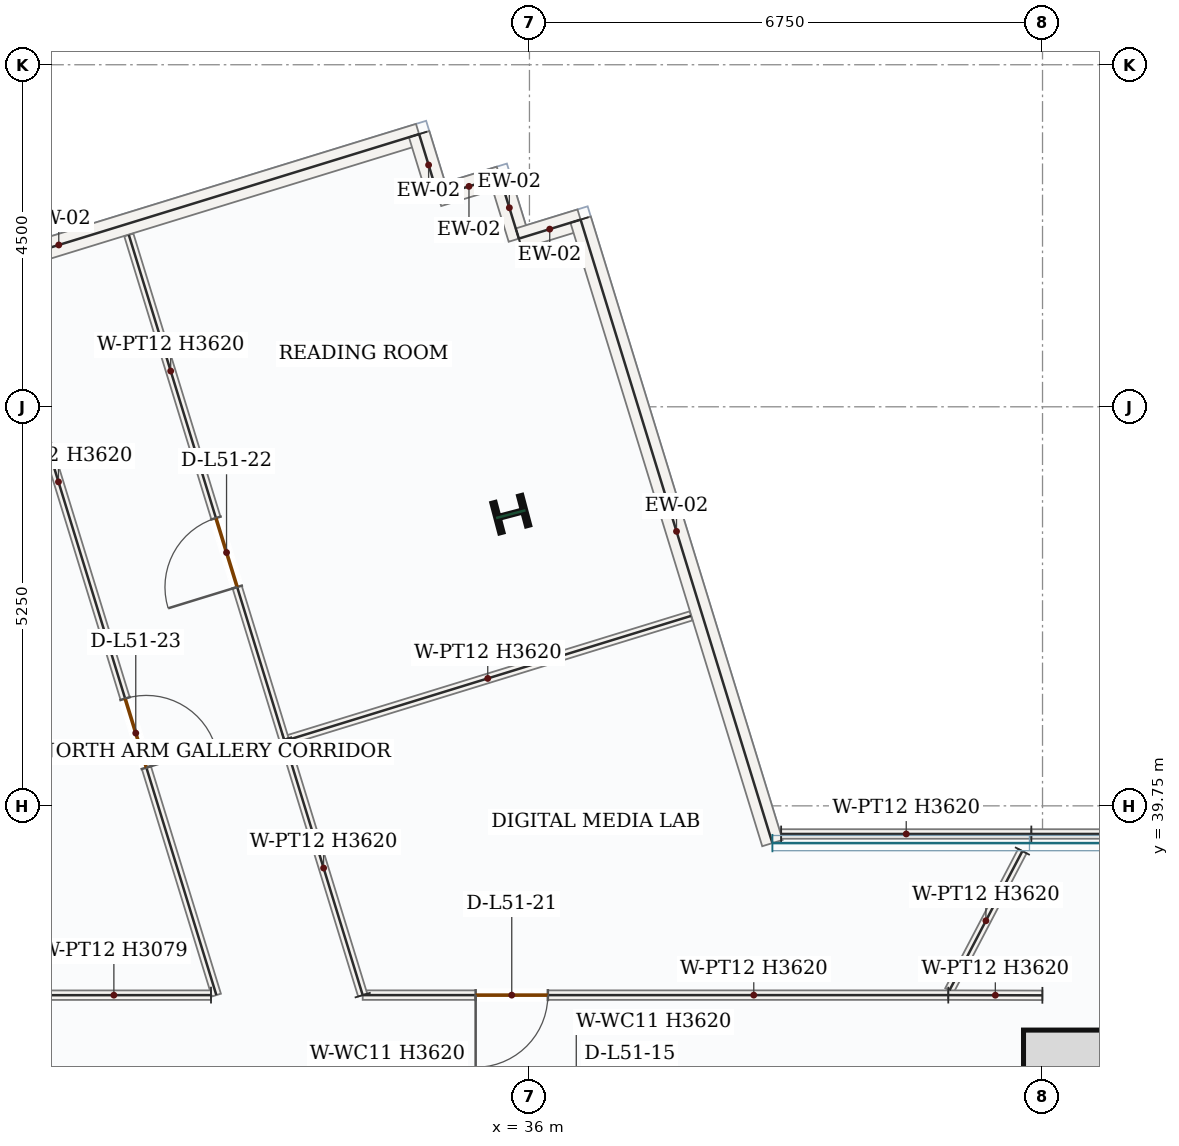
"""IFC4 building model, lengths in metres.
Left out: names, types, materials, properties, quantities, classifications, styles, units other than length and angle.
Written with IfcOpenShell. Run it as: python <this file> out.ifc"""

import sys

from ifc_helpers import new_model, si_unit, direction, frame, frame_2d, origin, origin_2d, place, context, subcontext, project, spatial, rectangle, i_section, extrude, source, transform, mapped, element, fill, save


model = new_model("IFC4")
c1 = context("Model", 3, precision=1e-05, world=origin(), true_north=direction((0.0, 1.0)))
c2 = subcontext(c1, "Body", "Model", "MODEL_VIEW")
j1 = project(units=[si_unit("LENGTHUNIT", "METRE"), si_unit("PLANEANGLEUNIT", "RADIAN")], contexts=[c1])
p1 = place(None, origin())
s1 = spatial("IfcSite", under=j1, at=p1, CompositionType="ELEMENT")
p2 = place(p1, origin())
s2 = spatial("IfcBuilding", under=s1, at=p2, CompositionType="ELEMENT")
p3 = place(p2, frame((0.0, 0.0, 217.5)))
s3 = spatial("IfcBuildingStorey", under=s2, at=p3, CompositionType="ELEMENT", Elevation=217.5)
p4 = place(p3, frame((43.0, 28.05, 0.0), z_axis=(0.0, 0.0, 1.0), x_axis=(0.0, 1.0, 0.0)))
e1 = element("IfcWall", 1, at=p4, inside=s3, PredefinedType="SHEAR", context=c2, shape_type="SweptSolid", body=[
    extrude(rectangle(XDim=8.55, YDim=0.5, at=frame_2d((4.275, 0.0))), origin(), (0.0, 0.0, 1.0), 3.62),
])
p5 = place(p4, frame((1.5, 0.0, 0.0)))
e2 = element("IfcOpeningElement", 2, at=p5, cuts=e1, PredefinedType="OPENING", context=c2, shape_type="SweptSolid", body=[
    extrude(rectangle(XDim=1.1, YDim=2.2, at=frame_2d((0.55, 1.1))), frame((0.0, 0.26, 0.0), z_axis=(0.0, -1.0, 0.0), x_axis=(1.0, 0.0, 0.0)), (0.0, 0.0, 1.0), 0.52),
])
m1 = source(origin(), c2, "Body", "SweptSolid", [
    extrude(rectangle(XDim=7.0, YDim=0.5, at=frame_2d((3.5, 0.0))), origin(), (0.0, 0.0, 1.0), 3.62),
])
p6 = place(p3, frame((43.25, 36.35, 0.0), z_axis=(0.0, 0.0, 1.0), x_axis=(1.0, 0.0, 0.0)))
e3 = element("IfcWall", 3, at=p6, inside=s3, PredefinedType="SHEAR", context=c2, shape_type="MappedRepresentation", body=[
    mapped(m1, transform((0.0, 0.0, 0.0), x_axis=(1.0, 0.0, 0.0), y_axis=(0.0, 1.0, 0.0), z_axis=(0.0, 0.0, 1.0), scale=1.0)),
])
m2 = source(origin(), c2, "Body", "SweptSolid", [
    extrude(rectangle(XDim=1.2, YDim=1.2, at=origin_2d()), origin(), (0.0, 0.0, 1.0), 3.9),
])
p7 = place(p3, frame((43.1, 36.2, 0.0), z_axis=(0.0, 0.0, 1.0), x_axis=(1.0, 0.0, 0.0)))
e4 = element("IfcColumn", 4, at=p7, inside=s3, PredefinedType="COLUMN", context=c2, shape_type="MappedRepresentation", body=[
    mapped(m2, transform((0.0, 0.0, 0.0), x_axis=(1.0, 0.0, 0.0), y_axis=(0.0, 1.0, 0.0), z_axis=(0.0, 0.0, 1.0), scale=1.0)),
])
m3 = source(origin(), c2, "Body", "SweptSolid", [
    extrude(i_section(OverallWidth=0.404, OverallDepth=0.407, WebThickness=0.027, FlangeThickness=0.044, FilletRadius=0.018, at=origin_2d()), origin(), (0.0, 0.0, 1.0), 3.9),
])
p8 = place(p3, frame((35.755, 43.588, 0.0), z_axis=(0.0, 0.0, 1.0), x_axis=(-0.255445757936, 0.966823388604, 0.0)))
e5 = element("IfcColumn", 5, at=p8, inside=s3, PredefinedType="COLUMN", context=c2, shape_type="MappedRepresentation", body=[
    mapped(m3, transform((0.0, 0.0, 0.0), x_axis=(1.0, 0.0, 0.0), y_axis=(0.0, 1.0, 0.0), z_axis=(0.0, 0.0, 1.0), scale=1.0)),
])
m4 = source(origin(), c2, "Body", "SweptSolid", [
    extrude(rectangle(XDim=9.92, YDim=0.28, at=frame_2d((4.96, 0.0))), origin(), (0.0, 0.0, 1.0), 3.62),
])
p9 = place(p3, frame((25.067, 45.671, 0.0), z_axis=(0.0, 0.0, 1.0), x_axis=(0.955796567368, 0.294028777175, 0.0)))
e6 = element("IfcWall", 6, at=p9, inside=s3, PredefinedType="SOLIDWALL", context=c2, shape_type="MappedRepresentation", body=[
    mapped(m4, transform((0.0, 0.0, 0.0), x_axis=(1.0, 0.0, 0.0), y_axis=(0.0, 1.0, 0.0), z_axis=(0.0, 0.0, 1.0), scale=1.0)),
])
m5 = source(origin(), c2, "Body", "SweptSolid", [
    extrude(rectangle(XDim=0.85, YDim=0.28, at=frame_2d((0.425, 0.0))), origin(), (0.0, 0.0, 1.0), 3.62),
])
for number, where, z_axis, x_axis in (
    (7, (34.548, 48.587, 0.0), (0.0, 0.0, 1.0), (0.294, -0.956, 0.0)),
    (8, (34.798, 47.775, 0.0), (0.0, 0.0, 1.0), (0.956, 0.294, 0.0)),
    (9, (35.611, 48.025, 0.0), (0.0, 0.0, 1.0), (0.294, -0.956, 0.0)),
    (10, (35.861, 47.212, 0.0), (0.0, 0.0, 1.0), (0.956, 0.294, 0.0)),
):
    element("IfcWall", number, at=place(p3, frame(where, z_axis=z_axis, x_axis=x_axis)), inside=s3, PredefinedType="SOLIDWALL", context=c2, shape_type="MappedRepresentation", body=[
        mapped(m5, transform((0.0, 0.0, 0.0), x_axis=(1.0, 0.0, 0.0), y_axis=(0.0, 1.0, 0.0), z_axis=(0.0, 0.0, 1.0), scale=1.0)),
    ])
m6 = source(origin(), c2, "Body", "SweptSolid", [
    extrude(rectangle(XDim=8.582, YDim=0.28, at=frame_2d((4.291, 0.0))), origin(), (0.0, 0.0, 1.0), 3.62),
])
p10 = place(p3, frame((36.673, 47.462, 0.0), z_axis=(0.0, 0.0, 1.0), x_axis=(0.294019877333, -0.955799305154, 0.0)))
e11 = element("IfcWall", 11, at=p10, inside=s3, PredefinedType="SOLIDWALL", context=c2, shape_type="MappedRepresentation", body=[
    mapped(m6, transform((0.0, 0.0, 0.0), x_axis=(1.0, 0.0, 0.0), y_axis=(0.0, 1.0, 0.0), z_axis=(0.0, 0.0, 1.0), scale=1.0)),
])
p11 = place(p3, frame((41.51, 37.26, 0.0), z_axis=(0.0, 0.0, 1.0), x_axis=(-1.0, 0.0, 0.0)))
e12 = element("IfcWall", 12, at=p11, inside=s3, PredefinedType="PARTITIONING", context=c2, shape_type="SweptSolid", body=[
    extrude(rectangle(XDim=7.704, YDim=0.125, at=frame_2d((3.852, 0.0))), origin(), (0.0, 0.0, 1.0), 3.62),
])
p12 = place(p11, frame((5.268, 0.0, 0.0)))
e13 = element("IfcOpeningElement", 13, at=p12, cuts=e12, PredefinedType="OPENING", context=c2, shape_type="SweptSolid", body=[
    extrude(rectangle(XDim=0.95, YDim=2.15, at=frame_2d((0.475, 1.075))), frame((0.0, 0.073, 0.0), z_axis=(0.0, -1.0, 0.0), x_axis=(1.0, 0.0, 0.0)), (0.0, 0.0, 1.0), 0.145),
])
m7 = source(origin(), c2, "Body", "SweptSolid", [
    extrude(rectangle(XDim=3.498, YDim=0.125, at=frame_2d((1.749, 0.0))), origin(), (0.0, 0.0, 1.0), 3.62),
])
p13 = place(p3, frame((33.806, 37.26, 0.0), z_axis=(0.0, 0.0, 1.0), x_axis=(-0.294012288782, 0.955801639487, 0.0)))
e14 = element("IfcWall", 14, at=p13, inside=s3, PredefinedType="PARTITIONING", context=c2, shape_type="MappedRepresentation", body=[
    mapped(m7, transform((0.0, 0.0, 0.0), x_axis=(1.0, 0.0, 0.0), y_axis=(0.0, 1.0, 0.0), z_axis=(0.0, 0.0, 1.0), scale=1.0)),
])
m8 = source(origin(), c2, "Body", "SweptSolid", [
    extrude(rectangle(XDim=5.595, YDim=0.125, at=frame_2d((2.797, 0.0))), origin(), (0.0, 0.0, 1.0), 3.62),
])
p14 = place(p3, frame((32.778, 40.604, 0.0), z_axis=(0.0, 0.0, 1.0), x_axis=(0.955787499516, 0.294058252339, 0.0)))
e15 = element("IfcWall", 15, at=p14, inside=s3, PredefinedType="PARTITIONING", context=c2, shape_type="MappedRepresentation", body=[
    mapped(m8, transform((0.0, 0.0, 0.0), x_axis=(1.0, 0.0, 0.0), y_axis=(0.0, 1.0, 0.0), z_axis=(0.0, 0.0, 1.0), scale=1.0)),
])
m9 = source(origin(), c2, "Body", "SweptSolid", [
    extrude(rectangle(XDim=3.292, YDim=0.125, at=frame_2d((1.646, 0.0))), origin(), (0.0, 0.0, 1.0), 3.62),
])
p15 = place(p3, frame((39.311, 39.38, 0.0), z_axis=(0.0, 0.0, 1.0), x_axis=(1.0, 0.0, 0.0)))
e16 = element("IfcWall", 16, at=p15, inside=s3, PredefinedType="PARTITIONING", context=c2, shape_type="MappedRepresentation", body=[
    mapped(m9, transform((0.0, 0.0, 0.0), x_axis=(1.0, 0.0, 0.0), y_axis=(0.0, 1.0, 0.0), z_axis=(0.0, 0.0, 1.0), scale=1.0)),
])
m10 = source(origin(), c2, "Body", "SweptSolid", [
    extrude(rectangle(XDim=2.069, YDim=0.125, at=frame_2d((1.035, 0.0))), origin(), (0.0, 0.0, 1.0), 3.62),
])
p16 = place(p3, frame((42.485, 39.155, 0.0), z_axis=(0.0, 0.0, 1.0), x_axis=(-0.46379536588, -0.885942356244, 0.0)))
e17 = element("IfcWall", 17, at=p16, inside=s3, PredefinedType="PARTITIONING", context=c2, shape_type="MappedRepresentation", body=[
    mapped(m10, transform((0.0, 0.0, 0.0), x_axis=(1.0, 0.0, 0.0), y_axis=(0.0, 1.0, 0.0), z_axis=(0.0, 0.0, 1.0), scale=1.0)),
])
p17 = place(p3, frame((32.771, 40.623, 0.0), z_axis=(0.0, 0.0, 1.0), x_axis=(-0.294016682873, 0.955800287818, 0.0)))
e18 = element("IfcWall", 18, at=p17, inside=s3, PredefinedType="PARTITIONING", context=c2, shape_type="SweptSolid", body=[
    extrude(rectangle(XDim=6.945, YDim=0.125, at=frame_2d((3.473, 0.0))), origin(), (0.0, 0.0, 1.0), 3.62),
])
p18 = place(p17, frame((2.098, 0.0, 0.0)))
e19 = element("IfcOpeningElement", 19, at=p18, cuts=e18, PredefinedType="OPENING", context=c2, shape_type="SweptSolid", body=[
    extrude(rectangle(XDim=0.95, YDim=2.15, at=frame_2d((0.475, 1.075))), frame((0.0, 0.073, 0.0), z_axis=(0.0, -1.0, 0.0), x_axis=(1.0, 0.0, 0.0)), (0.0, 0.0, 1.0), 0.145),
])
m11 = source(origin(), c2, "Body", "SweptSolid", [
    extrude(rectangle(XDim=1.238, YDim=0.125, at=frame_2d((0.619, 0.0))), origin(), (0.0, 0.0, 1.0), 3.62),
])
p19 = place(p3, frame((42.748, 37.257, 0.0), z_axis=(0.0, 0.0, 1.0), x_axis=(-0.9999976473, 0.002169192293, 0.0)))
e20 = element("IfcWall", 20, at=p19, inside=s3, PredefinedType="PARTITIONING", context=c2, shape_type="MappedRepresentation", body=[
    mapped(m11, transform((0.0, 0.0, 0.0), x_axis=(1.0, 0.0, 0.0), y_axis=(0.0, 1.0, 0.0), z_axis=(0.0, 0.0, 1.0), scale=1.0)),
])
m12 = source(origin(), c2, "Body", "SweptSolid", [
    extrude(rectangle(XDim=6.789, YDim=0.125, at=frame_2d((3.395, 0.0))), origin(), (0.0, 0.0, 1.0), 3.62),
])
p20 = place(p3, frame((42.603, 39.38, 0.0), z_axis=(0.0, 0.0, 1.0), x_axis=(1.0, 0.0, 0.0)))
e21 = element("IfcWall", 21, at=p20, inside=s3, PredefinedType="PARTITIONING", context=c2, shape_type="MappedRepresentation", body=[
    mapped(m12, transform((0.0, 0.0, 0.0), x_axis=(1.0, 0.0, 0.0), y_axis=(0.0, 1.0, 0.0), z_axis=(0.0, 0.0, 1.0), scale=1.0)),
])
p21 = place(p3, frame((28.971, 46.72, 0.0), z_axis=(0.0, 0.0, 1.0), x_axis=(0.294052915152, -0.955789141542, 0.0)))
e22 = element("IfcWall", 22, at=p21, inside=s3, PredefinedType="PARTITIONING", context=c2, shape_type="SweptSolid", body=[
    extrude(rectangle(XDim=9.897, YDim=0.125, at=frame_2d((4.949, 0.0))), origin(), (0.0, 0.0, 1.0), 3.62),
])
p22 = place(p21, frame((5.816, 0.0, 0.0)))
e23 = element("IfcOpeningElement", 23, at=p22, cuts=e22, PredefinedType="OPENING", context=c2, shape_type="SweptSolid", body=[
    extrude(rectangle(XDim=0.95, YDim=2.15, at=frame_2d((0.475, 1.075))), frame((0.0, 0.073, 0.0), z_axis=(0.0, -1.0, 0.0), x_axis=(1.0, 0.0, 0.0)), (0.0, 0.0, 1.0), 0.145),
])
m13 = source(origin(), c2, "Body", "SweptSolid", [
    extrude(rectangle(XDim=2.555, YDim=0.125, at=frame_2d((1.278, 0.0))), origin(), (0.0, 0.0, 1.0), 3.079),
])
p23 = place(p3, frame((31.81, 37.26, 0.0), z_axis=(0.0, 0.0, 1.0), x_axis=(-0.999999885905, -0.000477691739, 0.0)))
e24 = element("IfcWall", 24, at=p23, inside=s3, PredefinedType="PARTITIONING", context=c2, shape_type="MappedRepresentation", body=[
    mapped(m13, transform((0.0, 0.0, 0.0), x_axis=(1.0, 0.0, 0.0), y_axis=(0.0, 1.0, 0.0), z_axis=(0.0, 0.0, 1.0), scale=1.0)),
])
m14 = source(origin(), c2, "Body", "SweptSolid", [
    extrude(rectangle(XDim=0.95, YDim=2.15, at=frame_2d((0.475, 1.075))), frame((0.0, 0.025, 0.0), z_axis=(0.0, -1.0, 0.0), x_axis=(1.0, 0.0, 0.0)), (0.0, 0.0, 1.0), 0.05),
])
p24 = place(p12, origin())
e25 = element("IfcDoor", 25, at=p24, inside=s3, OperationType="SINGLE_SWING_RIGHT", PredefinedType="DOOR", context=c2, shape_type="MappedRepresentation", body=[
    mapped(m14, transform((0.0, 0.0, 0.0), x_axis=(1.0, 0.0, 0.0), y_axis=(0.0, 1.0, 0.0), z_axis=(0.0, 0.0, 1.0), scale=1.0)),
])
fill(e13, e25)
p25 = place(p18, origin())
e26 = element("IfcDoor", 26, at=p25, inside=s3, OperationType="SINGLE_SWING_LEFT", PredefinedType="DOOR", context=c2, shape_type="MappedRepresentation", body=[
    mapped(m14, transform((0.0, 0.0, 0.0), x_axis=(1.0, 0.0, 0.0), y_axis=(0.0, 1.0, 0.0), z_axis=(0.0, 0.0, 1.0), scale=1.0)),
])
fill(e19, e26)
p26 = place(p22, origin())
e27 = element("IfcDoor", 27, at=p26, inside=s3, OperationType="SINGLE_SWING_RIGHT", PredefinedType="DOOR", context=c2, shape_type="MappedRepresentation", body=[
    mapped(m14, transform((0.0, 0.0, 0.0), x_axis=(1.0, 0.0, 0.0), y_axis=(0.0, 1.0, 0.0), z_axis=(0.0, 0.0, 1.0), scale=1.0)),
])
fill(e23, e27)
save(model, sys.argv[1])
